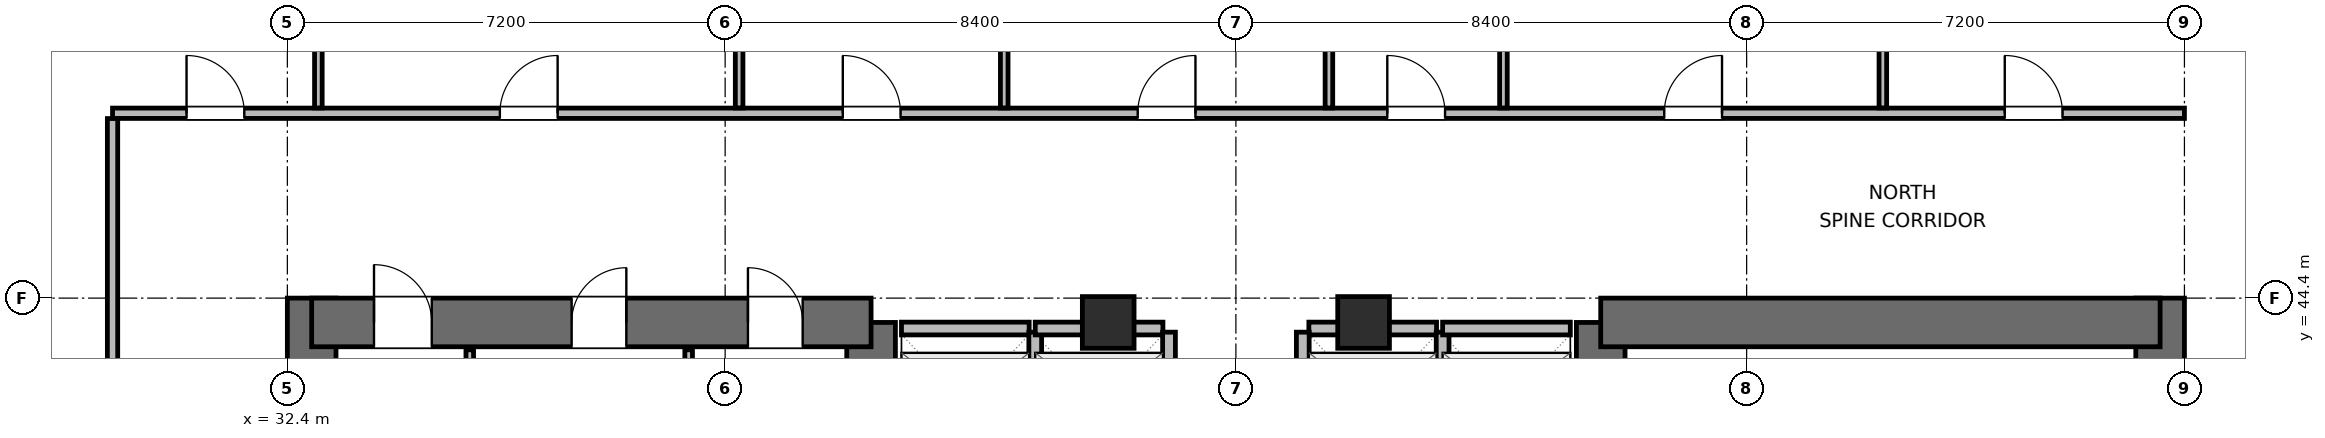
"""IFC4 building model, lengths in metres.
Left out: names, types, materials, properties, quantities, classifications, styles, units other than length and angle.
Written with IfcOpenShell. Run it as: python <this file> out.ifc"""

import sys

from ifc_helpers import new_model, si_unit, direction, frame, frame_2d, origin, origin_2d, place, context, subcontext, project, spatial, rectangle, extrude, element, fill, save


model = new_model("IFC4")
c1 = context("Model", 3, precision=1e-05, world=origin(), true_north=direction((0.0, 1.0)))
c2 = subcontext(c1, "Body", "Model", "MODEL_VIEW")
j1 = project(units=[si_unit("LENGTHUNIT", "METRE"), si_unit("PLANEANGLEUNIT", "RADIAN")], contexts=[c1])
p1 = place(None, origin())
s1 = spatial("IfcSite", under=j1, at=p1, CompositionType="ELEMENT")
p2 = place(p1, origin())
s2 = spatial("IfcBuilding", under=s1, at=p2, CompositionType="ELEMENT")
p3 = place(p2, frame((0.0, 0.0, 174.0)))
s3 = spatial("IfcBuildingStorey", under=s2, at=p3, CompositionType="ELEMENT", Elevation=174.0)
p4 = place(p3, frame((32.8, 27.6, 0.0), z_axis=(0.0, 0.0, 1.0), x_axis=(0.0, 1.0, 0.0)))
e1 = element("IfcWall", 1, at=p4, inside=s3, PredefinedType="SHEAR", context=c2, shape_type="SweptSolid", body=[
    extrude(rectangle(XDim=16.8, YDim=0.8, at=frame_2d((8.4, 0.0))), origin(), (0.0, 0.0, 1.0), 3.9),
])
p5 = place(p3, frame((42.0, 37.8, 0.0), z_axis=(0.0, 0.0, 1.0), x_axis=(0.0, 1.0, 0.0)))
e2 = element("IfcWall", 2, at=p5, inside=s3, PredefinedType="SHEAR", context=c2, shape_type="SweptSolid", body=[
    extrude(rectangle(XDim=6.2, YDim=0.8, at=frame_2d((3.1, 0.0))), origin(), (0.0, 0.0, 1.0), 3.9),
])
p6 = place(p3, frame((32.8, 44.0, 0.0), z_axis=(0.0, 0.0, 1.0), x_axis=(1.0, 0.0, 0.0)))
e3 = element("IfcWall", 3, at=p6, inside=s3, PredefinedType="SHEAR", context=c2, shape_type="SweptSolid", body=[
    extrude(rectangle(XDim=9.2, YDim=0.8, at=frame_2d((4.6, 0.0))), origin(), (0.0, 0.0, 1.0), 3.9),
])
p7 = place(p6, frame((1.025, 0.0, 0.0)))
e4 = element("IfcOpeningElement", 4, at=p7, cuts=e3, PredefinedType="OPENING", context=c2, shape_type="SweptSolid", body=[
    extrude(rectangle(XDim=0.95, YDim=2.04, at=frame_2d((0.475, 1.02))), frame((0.0, 0.41, 0.0), z_axis=(0.0, -1.0, 0.0), x_axis=(1.0, 0.0, 0.0)), (0.0, 0.0, 1.0), 0.82),
])
p8 = place(p6, frame((4.275, 0.0, 0.0)))
e5 = element("IfcOpeningElement", 5, at=p8, cuts=e3, PredefinedType="OPENING", context=c2, shape_type="SweptSolid", body=[
    extrude(rectangle(XDim=0.9, YDim=2.02, at=frame_2d((0.45, 1.01))), frame((0.0, 0.41, 0.0), z_axis=(0.0, -1.0, 0.0), x_axis=(1.0, 0.0, 0.0)), (0.0, 0.0, 1.0), 0.82),
])
p9 = place(p6, frame((7.175, 0.0, 0.0)))
e6 = element("IfcOpeningElement", 6, at=p9, cuts=e3, PredefinedType="OPENING", context=c2, shape_type="SweptSolid", body=[
    extrude(rectangle(XDim=0.9, YDim=2.02, at=frame_2d((0.45, 1.01))), frame((0.0, 0.41, 0.0), z_axis=(0.0, -1.0, 0.0), x_axis=(1.0, 0.0, 0.0)), (0.0, 0.0, 1.0), 0.82),
])
p10 = place(p3, frame((54.0, 38.0, 0.0), z_axis=(0.0, 0.0, 1.0), x_axis=(0.0, 1.0, 0.0)))
e7 = element("IfcWall", 7, at=p10, inside=s3, PredefinedType="SHEAR", context=c2, shape_type="SweptSolid", body=[
    extrude(rectangle(XDim=6.0, YDim=0.8, at=frame_2d((3.0, 0.0))), origin(), (0.0, 0.0, 1.0), 3.9),
])
p11 = place(p3, frame((63.2, 27.6, 0.0), z_axis=(0.0, 0.0, 1.0), x_axis=(0.0, 1.0, 0.0)))
e8 = element("IfcWall", 8, at=p11, inside=s3, PredefinedType="SHEAR", context=c2, shape_type="SweptSolid", body=[
    extrude(rectangle(XDim=16.8, YDim=0.8, at=frame_2d((8.4, 0.0))), origin(), (0.0, 0.0, 1.0), 3.9),
])
p12 = place(p3, frame((54.0, 44.0, 0.0), z_axis=(0.0, 0.0, 1.0), x_axis=(1.0, 0.0, 0.0)))
e9 = element("IfcWall", 9, at=p12, inside=s3, PredefinedType="SHEAR", context=c2, shape_type="SweptSolid", body=[
    extrude(rectangle(XDim=9.2, YDim=0.8, at=frame_2d((4.6, 0.0))), origin(), (0.0, 0.0, 1.0), 3.9),
])
for number, where, z_axis, x_axis in (
    (10, (45.9, 44.0, 0.0), (0.0, 0.0, 1.0), (1.0, 0.0, 0.0)),
    (11, (50.1, 44.0, 0.0), (0.0, 0.0, 1.0), (1.0, 0.0, 0.0)),
):
    element("IfcColumn", number, at=place(p3, frame(where, z_axis=z_axis, x_axis=x_axis)), inside=s3, PredefinedType="COLUMN", context=c2, shape_type="SweptSolid", body=[
        extrude(rectangle(XDim=0.85, YDim=0.85, at=origin_2d()), origin(), (0.0, 0.0, 1.0), 3.9),
    ])
for number, where, z_axis, x_axis in (
    (12, (35.4, 41.095, 0.0), (0.0, 0.0, 1.0), (0.0, 1.0, 0.0)),
    (13, (39.0, 41.095, 0.0), (0.0, 0.0, 1.0), (0.0, 1.0, 0.0)),
):
    element("IfcWall", number, at=place(p3, frame(where, z_axis=z_axis, x_axis=x_axis)), inside=s3, PredefinedType="PARTITIONING", context=c2, shape_type="SweptSolid", body=[
        extrude(rectangle(XDim=2.455, YDim=0.125, at=frame_2d((1.228, 0.0))), origin(), (0.0, 0.0, 1.0), 3.68),
    ])
p13 = place(p3, frame((42.5, 43.9, 0.0), z_axis=(0.0, 0.0, 1.0), x_axis=(1.0, 0.0, 0.0)))
e14 = element("IfcWall", 14, at=p13, inside=s3, PredefinedType="PARTITIONING", context=c2, shape_type="SweptSolid", body=[
    extrude(rectangle(XDim=2.1, YDim=0.21, at=frame_2d((1.05, 0.0))), origin(), (0.0, 0.0, 1.0), 2.765),
])
p14 = place(p3, frame((44.7, 41.56, 0.0), z_axis=(0.0, 0.0, 1.0), x_axis=(0.0, 1.0, 0.0)))
e15 = element("IfcWall", 15, at=p14, inside=s3, PredefinedType="PARTITIONING", context=c2, shape_type="SweptSolid", body=[
    extrude(rectangle(XDim=2.28, YDim=0.21, at=frame_2d((1.14, 0.0))), origin(), (0.0, 0.0, 1.0), 3.68),
])
p15 = place(p3, frame((44.7, 43.9, 0.0), z_axis=(0.0, 0.0, 1.0), x_axis=(1.0, 0.0, 0.0)))
e16 = element("IfcWall", 16, at=p15, inside=s3, PredefinedType="PARTITIONING", context=c2, shape_type="SweptSolid", body=[
    extrude(rectangle(XDim=2.1, YDim=0.21, at=frame_2d((1.05, 0.0))), origin(), (0.0, 0.0, 1.0), 2.765),
])
p16 = place(p3, frame((46.9, 41.56, 0.0), z_axis=(0.0, 0.0, 1.0), x_axis=(0.0, 1.0, 0.0)))
e17 = element("IfcWall", 17, at=p16, inside=s3, PredefinedType="PARTITIONING", context=c2, shape_type="SweptSolid", body=[
    extrude(rectangle(XDim=2.28, YDim=0.21, at=frame_2d((1.14, 0.0))), origin(), (0.0, 0.0, 1.0), 3.68),
])
p17 = place(p3, frame((49.2, 43.9, 0.0), z_axis=(0.0, 0.0, 1.0), x_axis=(1.0, 0.0, 0.0)))
e18 = element("IfcWall", 18, at=p17, inside=s3, PredefinedType="PARTITIONING", context=c2, shape_type="SweptSolid", body=[
    extrude(rectangle(XDim=2.1, YDim=0.21, at=frame_2d((1.05, 0.0))), origin(), (0.0, 0.0, 1.0), 2.765),
])
for number, where, z_axis, x_axis in (
    (19, (49.1, 41.56, 0.0), (0.0, 0.0, 1.0), (0.0, 1.0, 0.0)),
    (20, (51.4, 41.56, 0.0), (0.0, 0.0, 1.0), (0.0, 1.0, 0.0)),
):
    element("IfcWall", number, at=place(p3, frame(where, z_axis=z_axis, x_axis=x_axis)), inside=s3, PredefinedType="PARTITIONING", context=c2, shape_type="SweptSolid", body=[
        extrude(rectangle(XDim=2.28, YDim=0.21, at=frame_2d((1.14, 0.0))), origin(), (0.0, 0.0, 1.0), 3.68),
    ])
p18 = place(p3, frame((51.4, 43.9, 0.0), z_axis=(0.0, 0.0, 1.0), x_axis=(1.0, 0.0, 0.0)))
e21 = element("IfcWall", 21, at=p18, inside=s3, PredefinedType="PARTITIONING", context=c2, shape_type="SweptSolid", body=[
    extrude(rectangle(XDim=2.1, YDim=0.21, at=frame_2d((1.05, 0.0))), origin(), (0.0, 0.0, 1.0), 2.765),
])
p19 = place(p3, frame((29.525, 47.44, 0.0), z_axis=(0.0, 0.0, 1.0), x_axis=(1.0, 0.0, 0.0)))
e22 = element("IfcWall", 22, at=p19, inside=s3, PredefinedType="PARTITIONING", context=c2, shape_type="SweptSolid", body=[
    extrude(rectangle(XDim=34.075, YDim=0.17, at=frame_2d((17.038, 0.0))), origin(), (0.0, 0.0, 1.0), 3.68),
])
p20 = place(p19, frame((1.217, 0.0, 0.0)))
e23 = element("IfcOpeningElement", 23, at=p20, cuts=e22, PredefinedType="OPENING", context=c2, shape_type="SweptSolid", body=[
    extrude(rectangle(XDim=0.95, YDim=2.04, at=frame_2d((0.475, 1.02))), frame((0.0, 0.095, 0.0), z_axis=(0.0, -1.0, 0.0), x_axis=(1.0, 0.0, 0.0)), (0.0, 0.0, 1.0), 0.19),
])
p21 = place(p19, frame((6.37, 0.0, 0.0)))
e24 = element("IfcOpeningElement", 24, at=p21, cuts=e22, PredefinedType="OPENING", context=c2, shape_type="SweptSolid", body=[
    extrude(rectangle(XDim=0.95, YDim=2.04, at=frame_2d((0.475, 1.02))), frame((0.0, 0.095, 0.0), z_axis=(0.0, -1.0, 0.0), x_axis=(1.0, 0.0, 0.0)), (0.0, 0.0, 1.0), 0.19),
])
p22 = place(p19, frame((12.01, 0.0, 0.0)))
e25 = element("IfcOpeningElement", 25, at=p22, cuts=e22, PredefinedType="OPENING", context=c2, shape_type="SweptSolid", body=[
    extrude(rectangle(XDim=0.95, YDim=2.04, at=frame_2d((0.475, 1.02))), frame((0.0, 0.095, 0.0), z_axis=(0.0, -1.0, 0.0), x_axis=(1.0, 0.0, 0.0)), (0.0, 0.0, 1.0), 0.19),
])
p23 = place(p19, frame((16.86, 0.0, 0.0)))
e26 = element("IfcOpeningElement", 26, at=p23, cuts=e22, PredefinedType="OPENING", context=c2, shape_type="SweptSolid", body=[
    extrude(rectangle(XDim=0.95, YDim=2.04, at=frame_2d((0.475, 1.02))), frame((0.0, 0.095, 0.0), z_axis=(0.0, -1.0, 0.0), x_axis=(1.0, 0.0, 0.0)), (0.0, 0.0, 1.0), 0.19),
])
p24 = place(p19, frame((20.965, 0.0, 0.0)))
e27 = element("IfcOpeningElement", 27, at=p24, cuts=e22, PredefinedType="OPENING", context=c2, shape_type="SweptSolid", body=[
    extrude(rectangle(XDim=0.95, YDim=2.04, at=frame_2d((0.475, 1.02))), frame((0.0, 0.095, 0.0), z_axis=(0.0, -1.0, 0.0), x_axis=(1.0, 0.0, 0.0)), (0.0, 0.0, 1.0), 0.19),
])
p25 = place(p19, frame((25.52, 0.0, 0.0)))
e28 = element("IfcOpeningElement", 28, at=p25, cuts=e22, PredefinedType="OPENING", context=c2, shape_type="SweptSolid", body=[
    extrude(rectangle(XDim=0.95, YDim=2.04, at=frame_2d((0.475, 1.02))), frame((0.0, 0.095, 0.0), z_axis=(0.0, -1.0, 0.0), x_axis=(1.0, 0.0, 0.0)), (0.0, 0.0, 1.0), 0.19),
])
p26 = place(p19, frame((31.12, 0.0, 0.0)))
e29 = element("IfcOpeningElement", 29, at=p26, cuts=e22, PredefinedType="OPENING", context=c2, shape_type="SweptSolid", body=[
    extrude(rectangle(XDim=0.95, YDim=2.04, at=frame_2d((0.475, 1.02))), frame((0.0, 0.095, 0.0), z_axis=(0.0, -1.0, 0.0), x_axis=(1.0, 0.0, 0.0)), (0.0, 0.0, 1.0), 0.19),
])
p27 = place(p3, frame((29.525, 37.1, 0.0), z_axis=(0.0, 0.0, 1.0), x_axis=(0.0, 1.0, 0.0)))
e30 = element("IfcWall", 30, at=p27, inside=s3, PredefinedType="PARTITIONING", context=c2, shape_type="SweptSolid", body=[
    extrude(rectangle(XDim=10.253, YDim=0.17, at=frame_2d((5.126, 0.0))), origin(), (0.0, 0.0, 1.0), 3.68),
])
p28 = place(p27, frame((4.695, 0.0, 0.0)))
e31 = element("IfcOpeningElement", 31, at=p28, cuts=e30, PredefinedType="OPENING", context=c2, shape_type="SweptSolid", body=[
    extrude(rectangle(XDim=0.95, YDim=2.04, at=frame_2d((0.475, 1.02))), frame((0.0, 0.095, 0.0), z_axis=(0.0, -1.0, 0.0), x_axis=(1.0, 0.0, 0.0)), (0.0, 0.0, 1.0), 0.19),
])
p29 = place(p3, frame((32.91, 47.527, 0.0), z_axis=(0.0, 0.0, 1.0), x_axis=(0.0, 1.0, 0.0)))
e32 = element("IfcWall", 32, at=p29, inside=s3, PredefinedType="PARTITIONING", context=c2, shape_type="SweptSolid", body=[
    extrude(rectangle(XDim=14.638, YDim=0.125, at=frame_2d((7.319, 0.0))), origin(), (0.0, 0.0, 1.0), 3.68),
])
p30 = place(p3, frame((39.83, 47.527, 0.0), z_axis=(0.0, 0.0, 1.0), x_axis=(0.0, 1.0, 0.0)))
e33 = element("IfcWall", 33, at=p30, inside=s3, PredefinedType="PARTITIONING", context=c2, shape_type="SweptSolid", body=[
    extrude(rectangle(XDim=14.638, YDim=0.125, at=frame_2d((7.319, 0.0))), origin(), (0.0, 0.0, 1.0), 3.043),
])
p31 = place(p3, frame((44.19, 47.527, 0.0), z_axis=(0.0, 0.0, 1.0), x_axis=(0.0, 1.0, 0.0)))
e34 = element("IfcWall", 34, at=p31, inside=s3, PredefinedType="PARTITIONING", context=c2, shape_type="SweptSolid", body=[
    extrude(rectangle(XDim=12.998, YDim=0.125, at=frame_2d((6.499, 0.0))), origin(), (0.0, 0.0, 1.0), 3.043),
])
p32 = place(p3, frame((49.53, 47.527, 0.0), z_axis=(0.0, 0.0, 1.0), x_axis=(0.0, 1.0, 0.0)))
e35 = element("IfcWall", 35, at=p32, inside=s3, PredefinedType="PARTITIONING", context=c2, shape_type="SweptSolid", body=[
    extrude(rectangle(XDim=10.918, YDim=0.125, at=frame_2d((5.459, 0.0))), origin(), (0.0, 0.0, 1.0), 3.68),
])
p33 = place(p3, frame((52.4, 47.527, 0.0), z_axis=(0.0, 0.0, 1.0), x_axis=(0.0, 1.0, 0.0)))
e36 = element("IfcWall", 36, at=p33, inside=s3, PredefinedType="PARTITIONING", context=c2, shape_type="SweptSolid", body=[
    extrude(rectangle(XDim=10.918, YDim=0.125, at=frame_2d((5.459, 0.0))), origin(), (0.0, 0.0, 1.0), 3.043),
])
p34 = place(p3, frame((58.64, 47.527, 0.0), z_axis=(0.0, 0.0, 1.0), x_axis=(0.0, 1.0, 0.0)))
e37 = element("IfcWall", 37, at=p34, inside=s3, PredefinedType="PARTITIONING", context=c2, shape_type="SweptSolid", body=[
    extrude(rectangle(XDim=14.598, YDim=0.125, at=frame_2d((7.299, 0.0))), origin(), (0.0, 0.0, 1.0), 3.68),
])
p35 = place(p7, origin())
e38 = element("IfcDoor", 38, at=p35, inside=s3, OperationType="SINGLE_SWING_LEFT", PredefinedType="DOOR", context=c2, shape_type="SweptSolid", body=[
    extrude(rectangle(XDim=0.95, YDim=2.04, at=frame_2d((0.475, 1.02))), frame((0.0, 0.025, 0.0), z_axis=(0.0, -1.0, 0.0), x_axis=(1.0, 0.0, 0.0)), (0.0, 0.0, 1.0), 0.05),
])
fill(e4, e38)
p36 = place(p8, origin())
e39 = element("IfcDoor", 39, at=p36, inside=s3, OperationType="SINGLE_SWING_RIGHT", PredefinedType="DOOR", context=c2, shape_type="SweptSolid", body=[
    extrude(rectangle(XDim=0.9, YDim=2.02, at=frame_2d((0.45, 1.01))), frame((0.0, 0.025, 0.0), z_axis=(0.0, -1.0, 0.0), x_axis=(1.0, 0.0, 0.0)), (0.0, 0.0, 1.0), 0.05),
])
fill(e5, e39)
p37 = place(p9, origin())
e40 = element("IfcDoor", 40, at=p37, inside=s3, OperationType="SINGLE_SWING_LEFT", PredefinedType="DOOR", context=c2, shape_type="SweptSolid", body=[
    extrude(rectangle(XDim=0.9, YDim=2.02, at=frame_2d((0.45, 1.01))), frame((0.0, 0.025, 0.0), z_axis=(0.0, -1.0, 0.0), x_axis=(1.0, 0.0, 0.0)), (0.0, 0.0, 1.0), 0.05),
])
fill(e6, e40)
p38 = place(p20, origin())
e41 = element("IfcDoor", 41, at=p38, inside=s3, OperationType="SINGLE_SWING_LEFT", PredefinedType="DOOR", context=c2, shape_type="SweptSolid", body=[
    extrude(rectangle(XDim=0.95, YDim=2.04, at=frame_2d((0.475, 1.02))), frame((0.0, 0.025, 0.0), z_axis=(0.0, -1.0, 0.0), x_axis=(1.0, 0.0, 0.0)), (0.0, 0.0, 1.0), 0.05),
])
fill(e23, e41)
p39 = place(p21, origin())
e42 = element("IfcDoor", 42, at=p39, inside=s3, OperationType="SINGLE_SWING_RIGHT", PredefinedType="DOOR", context=c2, shape_type="SweptSolid", body=[
    extrude(rectangle(XDim=0.95, YDim=2.04, at=frame_2d((0.475, 1.02))), frame((0.0, 0.025, 0.0), z_axis=(0.0, -1.0, 0.0), x_axis=(1.0, 0.0, 0.0)), (0.0, 0.0, 1.0), 0.05),
])
fill(e24, e42)
p40 = place(p22, origin())
e43 = element("IfcDoor", 43, at=p40, inside=s3, OperationType="SINGLE_SWING_LEFT", PredefinedType="DOOR", context=c2, shape_type="SweptSolid", body=[
    extrude(rectangle(XDim=0.95, YDim=2.04, at=frame_2d((0.475, 1.02))), frame((0.0, 0.025, 0.0), z_axis=(0.0, -1.0, 0.0), x_axis=(1.0, 0.0, 0.0)), (0.0, 0.0, 1.0), 0.05),
])
fill(e25, e43)
p41 = place(p23, origin())
e44 = element("IfcDoor", 44, at=p41, inside=s3, OperationType="SINGLE_SWING_RIGHT", PredefinedType="DOOR", context=c2, shape_type="SweptSolid", body=[
    extrude(rectangle(XDim=0.95, YDim=2.04, at=frame_2d((0.475, 1.02))), frame((0.0, 0.025, 0.0), z_axis=(0.0, -1.0, 0.0), x_axis=(1.0, 0.0, 0.0)), (0.0, 0.0, 1.0), 0.05),
])
fill(e26, e44)
p42 = place(p24, origin())
e45 = element("IfcDoor", 45, at=p42, inside=s3, OperationType="SINGLE_SWING_LEFT", PredefinedType="DOOR", context=c2, shape_type="SweptSolid", body=[
    extrude(rectangle(XDim=0.95, YDim=2.04, at=frame_2d((0.475, 1.02))), frame((0.0, 0.025, 0.0), z_axis=(0.0, -1.0, 0.0), x_axis=(1.0, 0.0, 0.0)), (0.0, 0.0, 1.0), 0.05),
])
fill(e27, e45)
p43 = place(p25, origin())
e46 = element("IfcDoor", 46, at=p43, inside=s3, OperationType="SINGLE_SWING_RIGHT", PredefinedType="DOOR", context=c2, shape_type="SweptSolid", body=[
    extrude(rectangle(XDim=0.95, YDim=2.04, at=frame_2d((0.475, 1.02))), frame((0.0, 0.025, 0.0), z_axis=(0.0, -1.0, 0.0), x_axis=(1.0, 0.0, 0.0)), (0.0, 0.0, 1.0), 0.05),
])
fill(e28, e46)
p44 = place(p26, origin())
e47 = element("IfcDoor", 47, at=p44, inside=s3, OperationType="SINGLE_SWING_LEFT", PredefinedType="DOOR", context=c2, shape_type="SweptSolid", body=[
    extrude(rectangle(XDim=0.95, YDim=2.04, at=frame_2d((0.475, 1.02))), frame((0.0, 0.025, 0.0), z_axis=(0.0, -1.0, 0.0), x_axis=(1.0, 0.0, 0.0)), (0.0, 0.0, 1.0), 0.05),
])
fill(e29, e47)
save(model, sys.argv[1])
